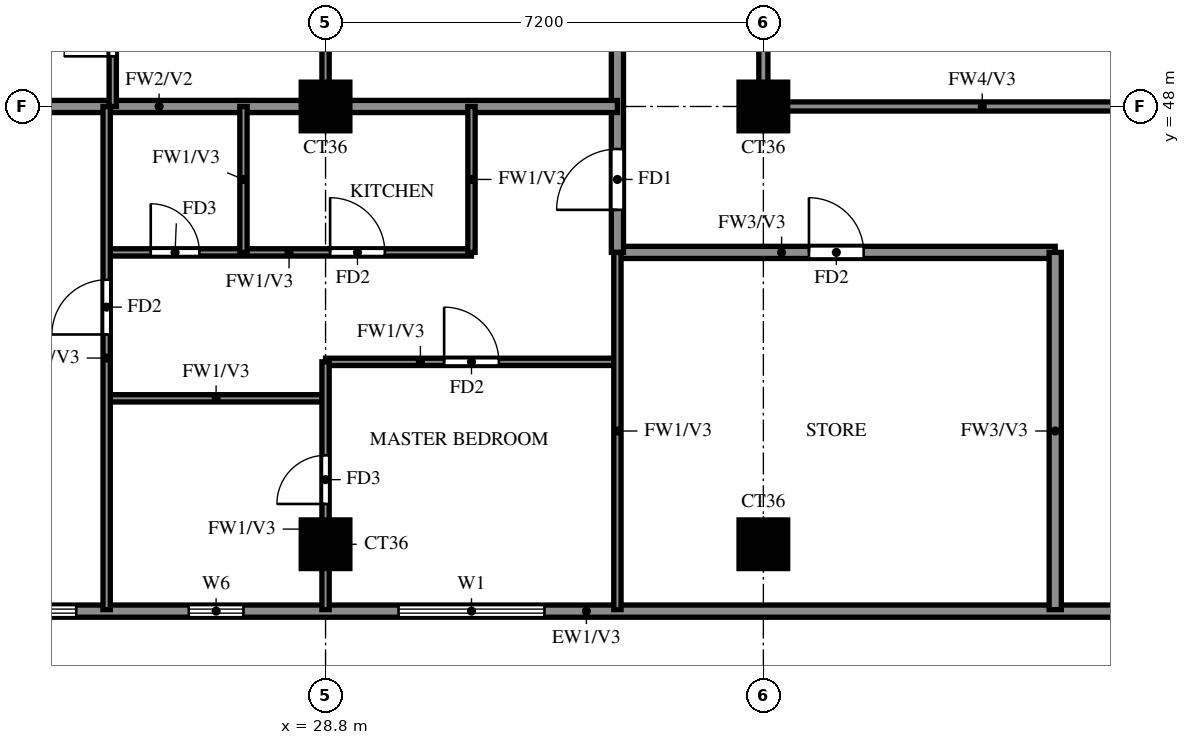
"""IFC4 building model, lengths in metres.
Left out: names, types, materials, properties, quantities, classifications, styles, units other than length and angle.
Written with IfcOpenShell. Run it as: python <this file> out.ifc"""

import sys

from ifc_helpers import new_model, si_unit, direction, frame, frame_2d, origin, origin_2d, place, context, subcontext, project, spatial, rectangle, extrude, source, transform, mapped, element, fill, save


model = new_model("IFC4")
c1 = context("Model", 3, precision=1e-05, world=origin(), true_north=direction((0.0, 1.0)))
c2 = subcontext(c1, "Body", "Model", "MODEL_VIEW")
j1 = project(units=[si_unit("LENGTHUNIT", "METRE"), si_unit("PLANEANGLEUNIT", "RADIAN")], contexts=[c1])
p1 = place(None, origin())
s1 = spatial("IfcSite", under=j1, at=p1, CompositionType="ELEMENT")
p2 = place(p1, origin())
s2 = spatial("IfcBuilding", under=s1, at=p2, CompositionType="ELEMENT")
p3 = place(p2, frame((0.0, 0.0, 250.0)))
s3 = spatial("IfcBuildingStorey", under=s2, at=p3, CompositionType="ELEMENT", Elevation=250.0)
m1 = source(origin(), c2, "Body", "SweptSolid", [
    extrude(rectangle(XDim=0.8, YDim=0.8, at=origin_2d()), origin(), (0.0, 0.0, 1.0), 3.22),
])
for number, where, z_axis, x_axis in (
    (1, (28.8, 40.8, 0.0), (0.0, 0.0, 1.0), (1.0, 0.0, 0.0)),
    (2, (36.0, 40.8, 0.0), (0.0, 0.0, 1.0), (1.0, 0.0, 0.0)),
    (3, (28.8, 48.0, 0.0), (0.0, 0.0, 1.0), (1.0, 0.0, 0.0)),
    (4, (36.0, 48.0, 0.0), (0.0, 0.0, 1.0), (1.0, 0.0, 0.0)),
):
    element("IfcColumn", number, at=place(p3, frame(where, z_axis=z_axis, x_axis=x_axis)), inside=s3, PredefinedType="COLUMN", context=c2, shape_type="MappedRepresentation", body=[
        mapped(m1, transform((0.0, 0.0, 0.0))),
    ])
p4 = place(p3, frame((22.2, 39.7, 0.0), z_axis=(0.0, 0.0, 1.0), x_axis=(1.0, 0.0, 0.0)))
e5 = element("IfcWall", 5, at=p4, inside=s3, PredefinedType="SOLIDWALL", context=c2, shape_type="SweptSolid", body=[
    extrude(rectangle(XDim=19.8, YDim=0.2, at=frame_2d((9.9, 0.0))), origin(), (0.0, 0.0, 1.0), 3.22),
])
p5 = place(p4, frame((0.7, 0.0, 0.6)))
e6 = element("IfcOpeningElement", 6, at=p5, cuts=e5, PredefinedType="OPENING", context=c2, shape_type="SweptSolid", body=[
    extrude(rectangle(XDim=1.8, YDim=2.4, at=frame_2d((0.9, 1.2))), frame((0.0, 0.11, 0.0), z_axis=(0.0, -1.0, 0.0), x_axis=(1.0, 0.0, 0.0)), (0.0, 0.0, 1.0), 0.22),
])
p6 = place(p4, frame((7.8, 0.0, 0.6)))
e7 = element("IfcOpeningElement", 7, at=p6, cuts=e5, PredefinedType="OPENING", context=c2, shape_type="SweptSolid", body=[
    extrude(rectangle(XDim=2.4, YDim=2.4, at=frame_2d((1.2, 1.2))), frame((0.0, 0.11, 0.0), z_axis=(0.0, -1.0, 0.0), x_axis=(1.0, 0.0, 0.0)), (0.0, 0.0, 1.0), 0.22),
])
p7 = place(p4, frame((4.35, 0.0, 1.5)))
e8 = element("IfcOpeningElement", 8, at=p7, cuts=e5, PredefinedType="OPENING", context=c2, shape_type="SweptSolid", body=[
    extrude(rectangle(XDim=0.9, YDim=0.9, at=frame_2d((0.45, 0.45))), frame((0.0, 0.11, 0.0), z_axis=(0.0, -1.0, 0.0), x_axis=(1.0, 0.0, 0.0)), (0.0, 0.0, 1.0), 0.22),
])
p8 = place(p3, frame((33.6, 45.6, 0.0), z_axis=(0.0, 0.0, 1.0), x_axis=(1.0, 0.0, 0.0)))
e9 = element("IfcWall", 9, at=p8, inside=s3, PredefinedType="SOLIDWALL", context=c2, shape_type="SweptSolid", body=[
    extrude(rectangle(XDim=7.2, YDim=0.2, at=frame_2d((3.6, 0.0))), origin(), (0.0, 0.0, 1.0), 3.22),
])
p9 = place(p8, frame((3.15, 0.0, 0.0)))
e10 = element("IfcOpeningElement", 10, at=p9, cuts=e9, PredefinedType="OPENING", context=c2, shape_type="SweptSolid", body=[
    extrude(rectangle(XDim=0.9, YDim=2.1, at=frame_2d((0.45, 1.05))), frame((0.0, 0.11, 0.0), z_axis=(0.0, -1.0, 0.0), x_axis=(1.0, 0.0, 0.0)), (0.0, 0.0, 1.0), 0.22),
])
p10 = place(p3, frame((33.6, 45.6, 0.0), z_axis=(0.0, 0.0, 1.0), x_axis=(0.0, 1.0, 0.0)))
e11 = element("IfcWall", 11, at=p10, inside=s3, PredefinedType="SOLIDWALL", context=c2, shape_type="SweptSolid", body=[
    extrude(rectangle(XDim=16.8, YDim=0.2, at=frame_2d((8.4, 0.0))), origin(), (0.0, 0.0, 1.0), 3.22),
])
p11 = place(p10, frame((0.7, 0.0, 0.0)))
e12 = element("IfcOpeningElement", 12, at=p11, cuts=e11, PredefinedType="OPENING", context=c2, shape_type="SweptSolid", body=[
    extrude(rectangle(XDim=1.0, YDim=2.1, at=frame_2d((0.5, 1.05))), frame((0.0, 0.11, 0.0), z_axis=(0.0, -1.0, 0.0), x_axis=(1.0, 0.0, 0.0)), (0.0, 0.0, 1.0), 0.22),
])
p12 = place(p10, frame((8.3, 0.0, 0.0)))
e13 = element("IfcOpeningElement", 13, at=p12, cuts=e11, PredefinedType="OPENING", context=c2, shape_type="SweptSolid", body=[
    extrude(rectangle(XDim=1.0, YDim=2.1, at=frame_2d((0.5, 1.05))), frame((0.0, 0.11, 0.0), z_axis=(0.0, -1.0, 0.0), x_axis=(1.0, 0.0, 0.0)), (0.0, 0.0, 1.0), 0.22),
])
p13 = place(p10, frame((15.1, 0.0, 0.0)))
e14 = element("IfcOpeningElement", 14, at=p13, cuts=e11, PredefinedType="OPENING", context=c2, shape_type="SweptSolid", body=[
    extrude(rectangle(XDim=1.0, YDim=2.1, at=frame_2d((0.5, 1.05))), frame((0.0, 0.11, 0.0), z_axis=(0.0, -1.0, 0.0), x_axis=(1.0, 0.0, 0.0)), (0.0, 0.0, 1.0), 0.22),
])
p14 = place(p3, frame((40.8, 39.725, 0.0), z_axis=(0.0, 0.0, 1.0), x_axis=(0.0, 1.0, 0.0)))
e15 = element("IfcWall", 15, at=p14, inside=s3, PredefinedType="SOLIDWALL", context=c2, shape_type="SweptSolid", body=[
    extrude(rectangle(XDim=5.875, YDim=0.2, at=frame_2d((2.938, 0.0))), origin(), (0.0, 0.0, 1.0), 3.22),
])
p15 = place(p3, frame((18.525, 48.0, 0.0), z_axis=(0.0, 0.0, 1.0), x_axis=(1.0, 0.0, 0.0)))
e16 = element("IfcWall", 16, at=p15, inside=s3, PredefinedType="SOLIDWALL", context=c2, shape_type="SweptSolid", body=[
    extrude(rectangle(XDim=15.075, YDim=0.2, at=frame_2d((7.538, 0.0))), origin(), (0.0, 0.0, 1.0), 3.22),
])
p16 = place(p3, frame((25.2, 43.2, 0.0), z_axis=(0.0, 0.0, 1.0), x_axis=(1.0, 0.0, 0.0)))
e17 = element("IfcWall", 17, at=p16, inside=s3, PredefinedType="PARTITIONING", context=c2, shape_type="SweptSolid", body=[
    extrude(rectangle(XDim=3.6, YDim=0.12, at=frame_2d((1.8, 0.0))), origin(), (0.0, 0.0, 1.0), 3.22),
])
p17 = place(p3, frame((28.8, 43.8, 0.0), z_axis=(0.0, 0.0, 1.0), x_axis=(1.0, 0.0, 0.0)))
e18 = element("IfcWall", 18, at=p17, inside=s3, PredefinedType="PARTITIONING", context=c2, shape_type="SweptSolid", body=[
    extrude(rectangle(XDim=4.8, YDim=0.12, at=frame_2d((2.4, 0.0))), origin(), (0.0, 0.0, 1.0), 3.22),
])
p18 = place(p17, frame((1.95, 0.0, 0.0)))
e19 = element("IfcOpeningElement", 19, at=p18, cuts=e18, PredefinedType="OPENING", context=c2, shape_type="SweptSolid", body=[
    extrude(rectangle(XDim=0.9, YDim=2.1, at=frame_2d((0.45, 1.05))), frame((0.0, 0.07, 0.0), z_axis=(0.0, -1.0, 0.0), x_axis=(1.0, 0.0, 0.0)), (0.0, 0.0, 1.0), 0.14),
])
p19 = place(p3, frame((25.2, 45.6, 0.0), z_axis=(0.0, 0.0, 1.0), x_axis=(1.0, 0.0, 0.0)))
e20 = element("IfcWall", 20, at=p19, inside=s3, PredefinedType="PARTITIONING", context=c2, shape_type="SweptSolid", body=[
    extrude(rectangle(XDim=6.0, YDim=0.12, at=frame_2d((3.0, 0.0))), origin(), (0.0, 0.0, 1.0), 3.22),
])
p20 = place(p19, frame((0.725, 0.0, 0.0)))
e21 = element("IfcOpeningElement", 21, at=p20, cuts=e20, PredefinedType="OPENING", context=c2, shape_type="SweptSolid", body=[
    extrude(rectangle(XDim=0.8, YDim=2.1, at=frame_2d((0.4, 1.05))), frame((0.0, 0.07, 0.0), z_axis=(0.0, -1.0, 0.0), x_axis=(1.0, 0.0, 0.0)), (0.0, 0.0, 1.0), 0.14),
])
p21 = place(p19, frame((3.675, 0.0, 0.0)))
e22 = element("IfcOpeningElement", 22, at=p21, cuts=e20, PredefinedType="OPENING", context=c2, shape_type="SweptSolid", body=[
    extrude(rectangle(XDim=0.9, YDim=2.1, at=frame_2d((0.45, 1.05))), frame((0.0, 0.07, 0.0), z_axis=(0.0, -1.0, 0.0), x_axis=(1.0, 0.0, 0.0)), (0.0, 0.0, 1.0), 0.14),
])
p22 = place(p3, frame((25.2, 39.725, 0.0), z_axis=(0.0, 0.0, 1.0), x_axis=(0.0, 1.0, 0.0)))
e23 = element("IfcWall", 23, at=p22, inside=s3, PredefinedType="PARTITIONING", context=c2, shape_type="SweptSolid", body=[
    extrude(rectangle(XDim=8.275, YDim=0.12, at=frame_2d((4.137, 0.0))), origin(), (0.0, 0.0, 1.0), 3.22),
])
p23 = place(p22, frame((4.525, 0.0, 0.0)))
e24 = element("IfcOpeningElement", 24, at=p23, cuts=e23, PredefinedType="OPENING", context=c2, shape_type="SweptSolid", body=[
    extrude(rectangle(XDim=0.9, YDim=2.1, at=frame_2d((0.45, 1.05))), frame((0.0, 0.07, 0.0), z_axis=(0.0, -1.0, 0.0), x_axis=(1.0, 0.0, 0.0)), (0.0, 0.0, 1.0), 0.14),
])
p24 = place(p3, frame((25.3, 48.0, 0.0), z_axis=(0.0, 0.0, 1.0), x_axis=(0.0, 1.0, 0.0)))
e25 = element("IfcWall", 25, at=p24, inside=s3, PredefinedType="PARTITIONING", context=c2, shape_type="SweptSolid", body=[
    extrude(rectangle(XDim=5.2, YDim=0.12, at=frame_2d((2.6, 0.0))), origin(), (0.0, 0.0, 1.0), 3.22),
])
p25 = place(p24, frame((0.825, 0.0, 0.0)))
e26 = element("IfcOpeningElement", 26, at=p25, cuts=e25, PredefinedType="OPENING", context=c2, shape_type="SweptSolid", body=[
    extrude(rectangle(XDim=0.8, YDim=2.1, at=frame_2d((0.4, 1.05))), frame((0.0, 0.07, 0.0), z_axis=(0.0, -1.0, 0.0), x_axis=(1.0, 0.0, 0.0)), (0.0, 0.0, 1.0), 0.14),
])
p26 = place(p3, frame((27.45, 45.6, 0.0), z_axis=(0.0, 0.0, 1.0), x_axis=(0.0, 1.0, 0.0)))
e27 = element("IfcWall", 27, at=p26, inside=s3, PredefinedType="PARTITIONING", context=c2, shape_type="SweptSolid", body=[
    extrude(rectangle(XDim=2.4, YDim=0.12, at=frame_2d((1.2, 0.0))), origin(), (0.0, 0.0, 1.0), 3.22),
])
p27 = place(p3, frame((28.8, 39.725, 0.0), z_axis=(0.0, 0.0, 1.0), x_axis=(0.0, 1.0, 0.0)))
e28 = element("IfcWall", 28, at=p27, inside=s3, PredefinedType="PARTITIONING", context=c2, shape_type="SweptSolid", body=[
    extrude(rectangle(XDim=4.075, YDim=0.12, at=frame_2d((2.038, 0.0))), origin(), (0.0, 0.0, 1.0), 3.22),
])
p28 = place(p27, frame((1.738, 0.0, 0.0)))
e29 = element("IfcOpeningElement", 29, at=p28, cuts=e28, PredefinedType="OPENING", context=c2, shape_type="SweptSolid", body=[
    extrude(rectangle(XDim=0.8, YDim=2.1, at=frame_2d((0.4, 1.05))), frame((0.0, 0.07, 0.0), z_axis=(0.0, -1.0, 0.0), x_axis=(1.0, 0.0, 0.0)), (0.0, 0.0, 1.0), 0.14),
])
p29 = place(p3, frame((28.8, 48.0, 0.0), z_axis=(0.0, 0.0, 1.0), x_axis=(0.0, 1.0, 0.0)))
e30 = element("IfcWall", 30, at=p29, inside=s3, PredefinedType="PARTITIONING", context=c2, shape_type="SweptSolid", body=[
    extrude(rectangle(XDim=5.2, YDim=0.12, at=frame_2d((2.6, 0.0))), origin(), (0.0, 0.0, 1.0), 3.22),
])
p30 = place(p3, frame((31.2, 45.6, 0.0), z_axis=(0.0, 0.0, 1.0), x_axis=(0.0, 1.0, 0.0)))
e31 = element("IfcWall", 31, at=p30, inside=s3, PredefinedType="PARTITIONING", context=c2, shape_type="SweptSolid", body=[
    extrude(rectangle(XDim=2.4, YDim=0.12, at=frame_2d((1.2, 0.0))), origin(), (0.0, 0.0, 1.0), 3.22),
])
p31 = place(p3, frame((33.6, 39.725, 0.0), z_axis=(0.0, 0.0, 1.0), x_axis=(0.0, 1.0, 0.0)))
e32 = element("IfcWall", 32, at=p31, inside=s3, PredefinedType="PARTITIONING", context=c2, shape_type="SweptSolid", body=[
    extrude(rectangle(XDim=5.875, YDim=0.12, at=frame_2d((2.938, 0.0))), origin(), (0.0, 0.0, 1.0), 3.22),
])
p32 = place(p3, frame((36.0, 48.0, 0.0), z_axis=(0.0, 0.0, 1.0), x_axis=(1.0, 0.0, 0.0)))
e33 = element("IfcWall", 33, at=p32, inside=s3, PredefinedType="SOLIDWALL", context=c2, shape_type="SweptSolid", body=[
    extrude(rectangle(XDim=7.2, YDim=0.15, at=frame_2d((3.6, 0.0))), origin(), (0.0, 0.0, 1.0), 2.32),
])
p33 = place(p3, frame((36.0, 48.0, 0.0), z_axis=(0.0, 0.0, 1.0), x_axis=(0.0, 1.0, 0.0)))
e34 = element("IfcWall", 34, at=p33, inside=s3, PredefinedType="SOLIDWALL", context=c2, shape_type="SweptSolid", body=[
    extrude(rectangle(XDim=14.4, YDim=0.15, at=frame_2d((7.2, 0.0))), origin(), (0.0, 0.0, 1.0), 2.32),
])
p34 = place(p5, origin())
e35 = element("IfcWindow", 35, at=p34, inside=s3, PartitioningType="DOUBLE_PANEL_VERTICAL", PredefinedType="WINDOW", context=c2, shape_type="SweptSolid", body=[
    extrude(rectangle(XDim=1.8, YDim=2.4, at=frame_2d((0.9, 1.2))), frame((0.0, 0.03, 0.0), z_axis=(0.0, -1.0, 0.0), x_axis=(1.0, 0.0, 0.0)), (0.0, 0.0, 1.0), 0.06),
])
fill(e6, e35)
p35 = place(p6, origin())
e36 = element("IfcWindow", 36, at=p35, inside=s3, PartitioningType="DOUBLE_PANEL_VERTICAL", PredefinedType="WINDOW", context=c2, shape_type="SweptSolid", body=[
    extrude(rectangle(XDim=2.4, YDim=2.4, at=frame_2d((1.2, 1.2))), frame((0.0, 0.03, 0.0), z_axis=(0.0, -1.0, 0.0), x_axis=(1.0, 0.0, 0.0)), (0.0, 0.0, 1.0), 0.06),
])
fill(e7, e36)
p36 = place(p7, origin())
e37 = element("IfcWindow", 37, at=p36, inside=s3, PartitioningType="SINGLE_PANEL", PredefinedType="WINDOW", context=c2, shape_type="SweptSolid", body=[
    extrude(rectangle(XDim=0.9, YDim=0.9, at=frame_2d((0.45, 0.45))), frame((0.0, 0.03, 0.0), z_axis=(0.0, -1.0, 0.0), x_axis=(1.0, 0.0, 0.0)), (0.0, 0.0, 1.0), 0.06),
])
fill(e8, e37)
p37 = place(p11, origin())
e38 = element("IfcDoor", 38, at=p37, inside=s3, OperationType="SINGLE_SWING_LEFT", PredefinedType="DOOR", context=c2, shape_type="SweptSolid", body=[
    extrude(rectangle(XDim=1.0, YDim=2.1, at=frame_2d((0.5, 1.05))), frame((0.0, 0.025, 0.0), z_axis=(0.0, -1.0, 0.0), x_axis=(1.0, 0.0, 0.0)), (0.0, 0.0, 1.0), 0.05),
])
fill(e12, e38)
p38 = place(p23, origin())
e39 = element("IfcDoor", 39, at=p38, inside=s3, OperationType="SINGLE_SWING_LEFT", PredefinedType="DOOR", context=c2, shape_type="SweptSolid", body=[
    extrude(rectangle(XDim=0.9, YDim=2.1, at=frame_2d((0.45, 1.05))), frame((0.0, 0.025, 0.0), z_axis=(0.0, -1.0, 0.0), x_axis=(1.0, 0.0, 0.0)), (0.0, 0.0, 1.0), 0.05),
])
fill(e24, e39)
p39 = place(p18, origin())
e40 = element("IfcDoor", 40, at=p39, inside=s3, OperationType="SINGLE_SWING_RIGHT", PredefinedType="DOOR", context=c2, shape_type="SweptSolid", body=[
    extrude(rectangle(XDim=0.9, YDim=2.1, at=frame_2d((0.45, 1.05))), frame((0.0, 0.025, 0.0), z_axis=(0.0, -1.0, 0.0), x_axis=(1.0, 0.0, 0.0)), (0.0, 0.0, 1.0), 0.05),
])
fill(e19, e40)
p40 = place(p28, origin())
e41 = element("IfcDoor", 41, at=p40, inside=s3, OperationType="SINGLE_SWING_RIGHT", PredefinedType="DOOR", context=c2, shape_type="SweptSolid", body=[
    extrude(rectangle(XDim=0.8, YDim=2.1, at=frame_2d((0.4, 1.05))), frame((0.0, 0.025, 0.0), z_axis=(0.0, -1.0, 0.0), x_axis=(1.0, 0.0, 0.0)), (0.0, 0.0, 1.0), 0.05),
])
fill(e29, e41)
p41 = place(p20, origin())
e42 = element("IfcDoor", 42, at=p41, inside=s3, OperationType="SINGLE_SWING_LEFT", PredefinedType="DOOR", context=c2, shape_type="SweptSolid", body=[
    extrude(rectangle(XDim=0.8, YDim=2.1, at=frame_2d((0.4, 1.05))), frame((0.0, 0.025, 0.0), z_axis=(0.0, -1.0, 0.0), x_axis=(1.0, 0.0, 0.0)), (0.0, 0.0, 1.0), 0.05),
])
fill(e21, e42)
p42 = place(p21, origin())
e43 = element("IfcDoor", 43, at=p42, inside=s3, OperationType="SINGLE_SWING_RIGHT", PredefinedType="DOOR", context=c2, shape_type="SweptSolid", body=[
    extrude(rectangle(XDim=0.9, YDim=2.1, at=frame_2d((0.45, 1.05))), frame((0.0, 0.025, 0.0), z_axis=(0.0, -1.0, 0.0), x_axis=(1.0, 0.0, 0.0)), (0.0, 0.0, 1.0), 0.05),
])
fill(e22, e43)
p43 = place(p9, origin())
e44 = element("IfcDoor", 44, at=p43, inside=s3, OperationType="SINGLE_SWING_LEFT", PredefinedType="DOOR", context=c2, shape_type="SweptSolid", body=[
    extrude(rectangle(XDim=0.9, YDim=2.1, at=frame_2d((0.45, 1.05))), frame((0.0, 0.025, 0.0), z_axis=(0.0, -1.0, 0.0), x_axis=(1.0, 0.0, 0.0)), (0.0, 0.0, 1.0), 0.05),
])
fill(e10, e44)
p44 = place(p25, origin())
e45 = element("IfcDoor", 45, at=p44, inside=s3, OperationType="SINGLE_SWING_RIGHT", PredefinedType="DOOR", context=c2, shape_type="SweptSolid", body=[
    extrude(rectangle(XDim=0.8, YDim=2.1, at=frame_2d((0.4, 1.05))), frame((0.0, 0.025, 0.0), z_axis=(0.0, -1.0, 0.0), x_axis=(1.0, 0.0, 0.0)), (0.0, 0.0, 1.0), 0.05),
])
fill(e26, e45)
save(model, sys.argv[1])
